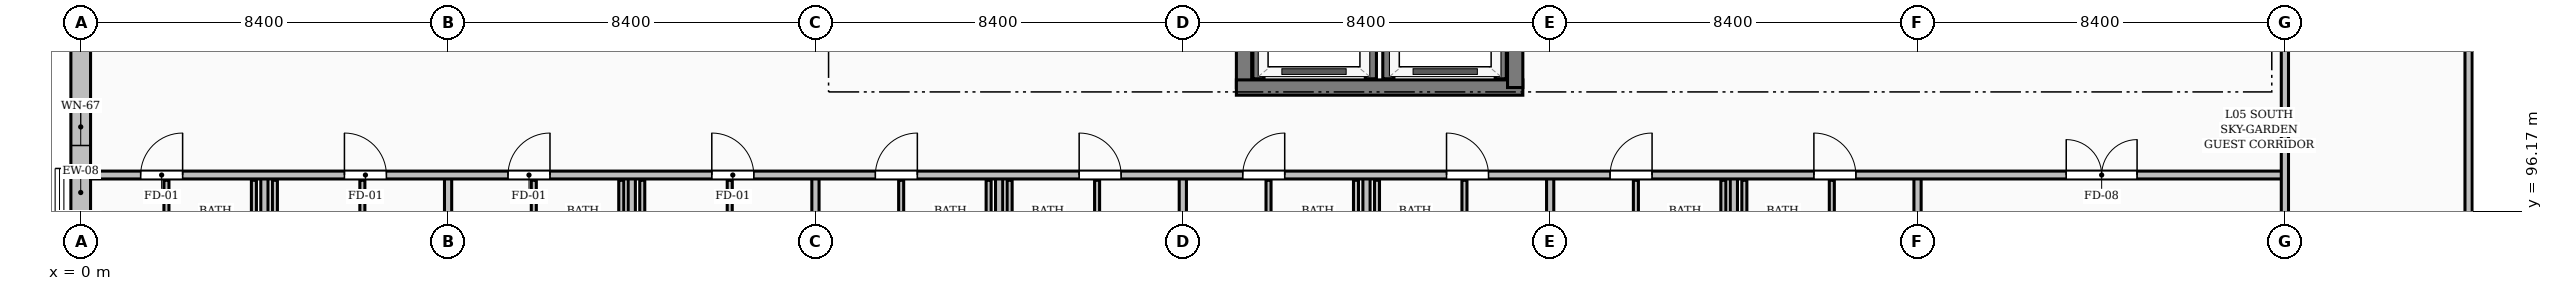
"""IFC4 building model, lengths in metres.
Left out: names, types, materials, properties, quantities, classifications, styles, units other than length and angle.
Written with IfcOpenShell. Run it as: python <this file> out.ifc"""

import sys

from ifc_helpers import new_model, si_unit, direction, frame, frame_2d, origin, place, context, subcontext, project, spatial, rectangle, extrude, element, fill, save


model = new_model("IFC4")
c1 = context("Model", 3, precision=1e-05, world=origin(), true_north=direction((0.0, 1.0)))
c2 = subcontext(c1, "Body", "Model", "MODEL_VIEW")
j1 = project(units=[si_unit("LENGTHUNIT", "METRE"), si_unit("PLANEANGLEUNIT", "RADIAN")], contexts=[c1])
p1 = place(None, origin())
s1 = spatial("IfcSite", under=j1, at=p1, CompositionType="ELEMENT")
p2 = place(p1, origin())
s2 = spatial("IfcBuilding", under=s1, at=p2, CompositionType="ELEMENT")
p3 = place(p2, frame((0.0, 0.0, 18.48)))
s3 = spatial("IfcBuildingStorey", under=s2, at=p3, CompositionType="ELEMENT", Elevation=18.48)
p4 = place(p3, frame((26.6, 99.0, 0.0), z_axis=(0.0, 0.0, 1.0), x_axis=(0.0, 1.0, 0.0)))
e1 = element("IfcWall", 1, at=p4, inside=s3, PredefinedType="SHEAR", context=c2, shape_type="SweptSolid", body=[
    extrude(rectangle(XDim=6.15, YDim=0.35, at=frame_2d((3.075, 0.0))), origin(), (0.0, 0.0, 1.0), 3.12),
])
p5 = place(p3, frame((26.425, 99.0, 0.0), z_axis=(0.0, 0.0, 1.0), x_axis=(1.0, 0.0, 0.0)))
e2 = element("IfcWall", 2, at=p5, inside=s3, PredefinedType="SHEAR", context=c2, shape_type="SweptSolid", body=[
    extrude(rectangle(XDim=6.55, YDim=0.35, at=frame_2d((3.275, 0.0))), origin(), (0.0, 0.0, 1.0), 3.12),
])
p6 = place(p3, frame((32.8, 99.0, 0.0), z_axis=(0.0, 0.0, 1.0), x_axis=(0.0, 1.0, 0.0)))
e3 = element("IfcWall", 3, at=p6, inside=s3, PredefinedType="SHEAR", context=c2, shape_type="SweptSolid", body=[
    extrude(rectangle(XDim=6.15, YDim=0.35, at=frame_2d((3.075, 0.0))), origin(), (0.0, 0.0, 1.0), 3.12),
])
p7 = place(p3, frame((0.0, 92.751, 0.0), z_axis=(0.0, 0.0, 1.0), x_axis=(0.0, 1.0, 0.0)))
e4 = element("IfcWall", 4, at=p7, inside=s3, PredefinedType="SOLIDWALL", context=c2, shape_type="SweptSolid", body=[
    extrude(rectangle(XDim=7.698, YDim=0.45, at=frame_2d((3.849, 0.0))), origin(), (0.0, 0.0, 1.0), 2.494),
])
p8 = place(p7, frame((2.374, 0.0, 0.3)))
e5 = element("IfcOpeningElement", 5, at=p8, cuts=e4, PredefinedType="OPENING", context=c2, shape_type="SweptSolid", body=[
    extrude(rectangle(XDim=0.85, YDim=1.9, at=frame_2d((0.425, 0.95))), frame((0.0, 0.235, 0.0), z_axis=(0.0, -1.0, 0.0), x_axis=(1.0, 0.0, 0.0)), (0.0, 0.0, 1.0), 0.47),
])
p9 = place(p7, frame((4.924, 0.0, 0.3)))
e6 = element("IfcOpeningElement", 6, at=p9, cuts=e4, PredefinedType="OPENING", context=c2, shape_type="SweptSolid", body=[
    extrude(rectangle(XDim=0.85, YDim=1.9, at=frame_2d((0.425, 0.95))), frame((0.0, 0.235, 0.0), z_axis=(0.0, -1.0, 0.0), x_axis=(1.0, 0.0, 0.0)), (0.0, 0.0, 1.0), 0.47),
])
for number, where, z_axis, x_axis in (
    (7, (26.93, 99.2, 0.0), (0.0, 0.0, 1.0), (0.0, 1.0, 0.0)),
    (8, (29.5, 99.2, 0.0), (0.0, 0.0, 1.0), (0.0, 1.0, 0.0)),
    (9, (29.9, 99.2, 0.0), (0.0, 0.0, 1.0), (0.0, 1.0, 0.0)),
    (10, (32.47, 99.2, 0.0), (0.0, 0.0, 1.0), (0.0, 1.0, 0.0)),
):
    element("IfcWall", number, at=place(p3, frame(where, z_axis=z_axis, x_axis=x_axis)), inside=s3, PredefinedType="SOLIDWALL", context=c2, shape_type="SweptSolid", body=[
        extrude(rectangle(XDim=2.2, YDim=0.255, at=frame_2d((1.1, 0.0))), origin(), (0.0, 0.0, 1.0), 3.12),
    ])
p10 = place(p3, frame((1.96, 94.73, 0.0), z_axis=(0.0, 0.0, 1.0), x_axis=(0.0, 1.0, 0.0)))
e11 = element("IfcWall", 11, at=p10, inside=s3, PredefinedType="PARTITIONING", context=c2, shape_type="SweptSolid", body=[
    extrude(rectangle(XDim=2.15, YDim=0.115, at=frame_2d((1.075, 0.0))), origin(), (0.0, 0.0, 1.0), 2.642),
])
for number, where, z_axis, x_axis in (
    (12, (3.96, 94.73, 0.0), (0.0, 0.0, 1.0), (0.0, 1.0, 0.0)),
    (13, (4.44, 94.73, 0.0), (0.0, 0.0, 1.0), (0.0, 1.0, 0.0)),
):
    element("IfcWall", number, at=place(p3, frame(where, z_axis=z_axis, x_axis=x_axis)), inside=s3, PredefinedType="PARTITIONING", context=c2, shape_type="SweptSolid", body=[
        extrude(rectangle(XDim=2.15, YDim=0.115, at=frame_2d((1.075, 0.0))), origin(), (0.0, 0.0, 1.0), 3.12),
    ])
p11 = place(p3, frame((6.44, 94.73, 0.0), z_axis=(0.0, 0.0, 1.0), x_axis=(0.0, 1.0, 0.0)))
e14 = element("IfcWall", 14, at=p11, inside=s3, PredefinedType="PARTITIONING", context=c2, shape_type="SweptSolid", body=[
    extrude(rectangle(XDim=2.15, YDim=0.115, at=frame_2d((1.075, 0.0))), origin(), (0.0, 0.0, 1.0), 2.642),
])
p12 = place(p3, frame((4.2, 92.625, 0.0), z_axis=(0.0, 0.0, 1.0), x_axis=(0.0, 1.0, 0.0)))
e15 = element("IfcWall", 15, at=p12, inside=s3, PredefinedType="PARTITIONING", context=c2, shape_type="SweptSolid", body=[
    extrude(rectangle(XDim=4.375, YDim=0.165, at=frame_2d((2.188, 0.0))), origin(), (0.0, 0.0, 1.0), 3.12),
])
for number, where, z_axis, x_axis in (
    (16, (10.36, 94.73, 0.0), (0.0, 0.0, 1.0), (0.0, 1.0, 0.0)),
    (17, (12.36, 94.73, 0.0), (0.0, 0.0, 1.0), (0.0, 1.0, 0.0)),
    (18, (12.84, 94.73, 0.0), (0.0, 0.0, 1.0), (0.0, 1.0, 0.0)),
    (19, (14.84, 94.73, 0.0), (0.0, 0.0, 1.0), (0.0, 1.0, 0.0)),
):
    element("IfcWall", number, at=place(p3, frame(where, z_axis=z_axis, x_axis=x_axis)), inside=s3, PredefinedType="PARTITIONING", context=c2, shape_type="SweptSolid", body=[
        extrude(rectangle(XDim=2.15, YDim=0.115, at=frame_2d((1.075, 0.0))), origin(), (0.0, 0.0, 1.0), 3.12),
    ])
p13 = place(p3, frame((12.6, 92.53, 0.0), z_axis=(0.0, 0.0, 1.0), x_axis=(0.0, 1.0, 0.0)))
e20 = element("IfcWall", 20, at=p13, inside=s3, PredefinedType="PARTITIONING", context=c2, shape_type="SweptSolid", body=[
    extrude(rectangle(XDim=4.47, YDim=0.165, at=frame_2d((2.235, 0.0))), origin(), (0.0, 0.0, 1.0), 3.12),
])
p14 = place(p3, frame((8.4, 92.75, 0.0), z_axis=(0.0, 0.0, 1.0), x_axis=(0.0, 1.0, 0.0)))
e21 = element("IfcWall", 21, at=p14, inside=s3, PredefinedType="PARTITIONING", context=c2, shape_type="SweptSolid", body=[
    extrude(rectangle(XDim=4.25, YDim=0.165, at=frame_2d((2.125, 0.0))), origin(), (0.0, 0.0, 1.0), 2.455),
])
p15 = place(p3, frame((18.76, 94.73, 0.0), z_axis=(0.0, 0.0, 1.0), x_axis=(0.0, 1.0, 0.0)))
e22 = element("IfcWall", 22, at=p15, inside=s3, PredefinedType="PARTITIONING", context=c2, shape_type="SweptSolid", body=[
    extrude(rectangle(XDim=2.15, YDim=0.115, at=frame_2d((1.075, 0.0))), origin(), (0.0, 0.0, 1.0), 2.642),
])
for number, where, z_axis, x_axis in (
    (23, (20.76, 94.73, 0.0), (0.0, 0.0, 1.0), (0.0, 1.0, 0.0)),
    (24, (21.24, 94.73, 0.0), (0.0, 0.0, 1.0), (0.0, 1.0, 0.0)),
):
    element("IfcWall", number, at=place(p3, frame(where, z_axis=z_axis, x_axis=x_axis)), inside=s3, PredefinedType="PARTITIONING", context=c2, shape_type="SweptSolid", body=[
        extrude(rectangle(XDim=2.15, YDim=0.115, at=frame_2d((1.075, 0.0))), origin(), (0.0, 0.0, 1.0), 3.12),
    ])
p16 = place(p3, frame((23.24, 94.73, 0.0), z_axis=(0.0, 0.0, 1.0), x_axis=(0.0, 1.0, 0.0)))
e25 = element("IfcWall", 25, at=p16, inside=s3, PredefinedType="PARTITIONING", context=c2, shape_type="SweptSolid", body=[
    extrude(rectangle(XDim=2.15, YDim=0.115, at=frame_2d((1.075, 0.0))), origin(), (0.0, 0.0, 1.0), 2.642),
])
p17 = place(p3, frame((21.0, 92.54, 0.0), z_axis=(0.0, 0.0, 1.0), x_axis=(0.0, 1.0, 0.0)))
e26 = element("IfcWall", 26, at=p17, inside=s3, PredefinedType="PARTITIONING", context=c2, shape_type="SweptSolid", body=[
    extrude(rectangle(XDim=4.46, YDim=0.165, at=frame_2d((2.23, 0.0))), origin(), (0.0, 0.0, 1.0), 3.12),
])
p18 = place(p3, frame((16.8, 92.75, 0.0), z_axis=(0.0, 0.0, 1.0), x_axis=(0.0, 1.0, 0.0)))
e27 = element("IfcWall", 27, at=p18, inside=s3, PredefinedType="PARTITIONING", context=c2, shape_type="SweptSolid", body=[
    extrude(rectangle(XDim=4.25, YDim=0.165, at=frame_2d((2.125, 0.0))), origin(), (0.0, 0.0, 1.0), 2.455),
])
for number, where, z_axis, x_axis in (
    (28, (27.16, 94.73, 0.0), (0.0, 0.0, 1.0), (0.0, 1.0, 0.0)),
    (29, (29.16, 94.73, 0.0), (0.0, 0.0, 1.0), (0.0, 1.0, 0.0)),
    (30, (29.64, 94.73, 0.0), (0.0, 0.0, 1.0), (0.0, 1.0, 0.0)),
    (31, (31.64, 94.73, 0.0), (0.0, 0.0, 1.0), (0.0, 1.0, 0.0)),
):
    element("IfcWall", number, at=place(p3, frame(where, z_axis=z_axis, x_axis=x_axis)), inside=s3, PredefinedType="PARTITIONING", context=c2, shape_type="SweptSolid", body=[
        extrude(rectangle(XDim=2.15, YDim=0.115, at=frame_2d((1.075, 0.0))), origin(), (0.0, 0.0, 1.0), 3.12),
    ])
p19 = place(p3, frame((29.4, 92.55, 0.0), z_axis=(0.0, 0.0, 1.0), x_axis=(0.0, 1.0, 0.0)))
e32 = element("IfcWall", 32, at=p19, inside=s3, PredefinedType="PARTITIONING", context=c2, shape_type="SweptSolid", body=[
    extrude(rectangle(XDim=4.45, YDim=0.165, at=frame_2d((2.225, 0.0))), origin(), (0.0, 0.0, 1.0), 3.12),
])
p20 = place(p3, frame((25.2, 92.75, 0.0), z_axis=(0.0, 0.0, 1.0), x_axis=(0.0, 1.0, 0.0)))
e33 = element("IfcWall", 33, at=p20, inside=s3, PredefinedType="PARTITIONING", context=c2, shape_type="SweptSolid", body=[
    extrude(rectangle(XDim=4.25, YDim=0.165, at=frame_2d((2.125, 0.0))), origin(), (0.0, 0.0, 1.0), 2.455),
])
p21 = place(p3, frame((35.56, 94.73, 0.0), z_axis=(0.0, 0.0, 1.0), x_axis=(0.0, 1.0, 0.0)))
e34 = element("IfcWall", 34, at=p21, inside=s3, PredefinedType="PARTITIONING", context=c2, shape_type="SweptSolid", body=[
    extrude(rectangle(XDim=2.15, YDim=0.115, at=frame_2d((1.075, 0.0))), origin(), (0.0, 0.0, 1.0), 2.642),
])
for number, where, z_axis, x_axis in (
    (35, (37.56, 94.73, 0.0), (0.0, 0.0, 1.0), (0.0, 1.0, 0.0)),
    (36, (38.04, 94.73, 0.0), (0.0, 0.0, 1.0), (0.0, 1.0, 0.0)),
):
    element("IfcWall", number, at=place(p3, frame(where, z_axis=z_axis, x_axis=x_axis)), inside=s3, PredefinedType="PARTITIONING", context=c2, shape_type="SweptSolid", body=[
        extrude(rectangle(XDim=2.15, YDim=0.115, at=frame_2d((1.075, 0.0))), origin(), (0.0, 0.0, 1.0), 3.12),
    ])
p22 = place(p3, frame((40.04, 94.73, 0.0), z_axis=(0.0, 0.0, 1.0), x_axis=(0.0, 1.0, 0.0)))
e37 = element("IfcWall", 37, at=p22, inside=s3, PredefinedType="PARTITIONING", context=c2, shape_type="SweptSolid", body=[
    extrude(rectangle(XDim=2.15, YDim=0.115, at=frame_2d((1.075, 0.0))), origin(), (0.0, 0.0, 1.0), 2.642),
])
p23 = place(p3, frame((37.8, 92.562, 0.0), z_axis=(0.0, 0.0, 1.0), x_axis=(0.0, 1.0, 0.0)))
e38 = element("IfcWall", 38, at=p23, inside=s3, PredefinedType="PARTITIONING", context=c2, shape_type="SweptSolid", body=[
    extrude(rectangle(XDim=4.438, YDim=0.165, at=frame_2d((2.219, 0.0))), origin(), (0.0, 0.0, 1.0), 3.12),
])
for number, where, z_axis, x_axis in (
    (39, (33.6, 92.75, 0.0), (0.0, 0.0, 1.0), (0.0, 1.0, 0.0)),
    (40, (42.0, 92.75, 0.0), (0.0, 0.0, 1.0), (0.0, 1.0, 0.0)),
):
    element("IfcWall", number, at=place(p3, frame(where, z_axis=z_axis, x_axis=x_axis)), inside=s3, PredefinedType="PARTITIONING", context=c2, shape_type="SweptSolid", body=[
        extrude(rectangle(XDim=4.25, YDim=0.165, at=frame_2d((2.125, 0.0))), origin(), (0.0, 0.0, 1.0), 2.455),
    ])
p24 = place(p3, frame((0.225, 97.0, 0.0), z_axis=(0.0, 0.0, 1.0), x_axis=(1.0, 0.0, 0.0)))
e41 = element("IfcWall", 41, at=p24, inside=s3, PredefinedType="PARTITIONING", context=c2, shape_type="SweptSolid", body=[
    extrude(rectangle(XDim=50.175, YDim=0.18, at=frame_2d((25.087, 0.0))), origin(), (0.0, 0.0, 1.0), 3.12),
])
p25 = place(p24, frame((1.145, 0.0, 0.0)))
e42 = element("IfcOpeningElement", 42, at=p25, cuts=e41, PredefinedType="OPENING", context=c2, shape_type="SweptSolid", body=[
    extrude(rectangle(XDim=0.96, YDim=2.15, at=frame_2d((0.48, 1.075))), frame((0.0, 0.1, 0.0), z_axis=(0.0, -1.0, 0.0), x_axis=(1.0, 0.0, 0.0)), (0.0, 0.0, 1.0), 0.2),
])
p26 = place(p24, frame((5.805, 0.0, 0.0)))
e43 = element("IfcOpeningElement", 43, at=p26, cuts=e41, PredefinedType="OPENING", context=c2, shape_type="SweptSolid", body=[
    extrude(rectangle(XDim=0.96, YDim=2.15, at=frame_2d((0.48, 1.075))), frame((0.0, 0.1, 0.0), z_axis=(0.0, -1.0, 0.0), x_axis=(1.0, 0.0, 0.0)), (0.0, 0.0, 1.0), 0.2),
])
p27 = place(p24, frame((9.545, 0.0, 0.0)))
e44 = element("IfcOpeningElement", 44, at=p27, cuts=e41, PredefinedType="OPENING", context=c2, shape_type="SweptSolid", body=[
    extrude(rectangle(XDim=0.96, YDim=2.15, at=frame_2d((0.48, 1.075))), frame((0.0, 0.1, 0.0), z_axis=(0.0, -1.0, 0.0), x_axis=(1.0, 0.0, 0.0)), (0.0, 0.0, 1.0), 0.2),
])
p28 = place(p24, frame((14.205, 0.0, 0.0)))
e45 = element("IfcOpeningElement", 45, at=p28, cuts=e41, PredefinedType="OPENING", context=c2, shape_type="SweptSolid", body=[
    extrude(rectangle(XDim=0.96, YDim=2.15, at=frame_2d((0.48, 1.075))), frame((0.0, 0.1, 0.0), z_axis=(0.0, -1.0, 0.0), x_axis=(1.0, 0.0, 0.0)), (0.0, 0.0, 1.0), 0.2),
])
p29 = place(p24, frame((17.945, 0.0, 0.0)))
e46 = element("IfcOpeningElement", 46, at=p29, cuts=e41, PredefinedType="OPENING", context=c2, shape_type="SweptSolid", body=[
    extrude(rectangle(XDim=0.96, YDim=2.15, at=frame_2d((0.48, 1.075))), frame((0.0, 0.1, 0.0), z_axis=(0.0, -1.0, 0.0), x_axis=(1.0, 0.0, 0.0)), (0.0, 0.0, 1.0), 0.2),
])
p30 = place(p24, frame((22.605, 0.0, 0.0)))
e47 = element("IfcOpeningElement", 47, at=p30, cuts=e41, PredefinedType="OPENING", context=c2, shape_type="SweptSolid", body=[
    extrude(rectangle(XDim=0.96, YDim=2.15, at=frame_2d((0.48, 1.075))), frame((0.0, 0.1, 0.0), z_axis=(0.0, -1.0, 0.0), x_axis=(1.0, 0.0, 0.0)), (0.0, 0.0, 1.0), 0.2),
])
p31 = place(p24, frame((26.345, 0.0, 0.0)))
e48 = element("IfcOpeningElement", 48, at=p31, cuts=e41, PredefinedType="OPENING", context=c2, shape_type="SweptSolid", body=[
    extrude(rectangle(XDim=0.96, YDim=2.15, at=frame_2d((0.48, 1.075))), frame((0.0, 0.1, 0.0), z_axis=(0.0, -1.0, 0.0), x_axis=(1.0, 0.0, 0.0)), (0.0, 0.0, 1.0), 0.2),
])
p32 = place(p24, frame((31.005, 0.0, 0.0)))
e49 = element("IfcOpeningElement", 49, at=p32, cuts=e41, PredefinedType="OPENING", context=c2, shape_type="SweptSolid", body=[
    extrude(rectangle(XDim=0.96, YDim=2.15, at=frame_2d((0.48, 1.075))), frame((0.0, 0.1, 0.0), z_axis=(0.0, -1.0, 0.0), x_axis=(1.0, 0.0, 0.0)), (0.0, 0.0, 1.0), 0.2),
])
p33 = place(p24, frame((34.745, 0.0, 0.0)))
e50 = element("IfcOpeningElement", 50, at=p33, cuts=e41, PredefinedType="OPENING", context=c2, shape_type="SweptSolid", body=[
    extrude(rectangle(XDim=0.96, YDim=2.15, at=frame_2d((0.48, 1.075))), frame((0.0, 0.1, 0.0), z_axis=(0.0, -1.0, 0.0), x_axis=(1.0, 0.0, 0.0)), (0.0, 0.0, 1.0), 0.2),
])
p34 = place(p24, frame((39.405, 0.0, 0.0)))
e51 = element("IfcOpeningElement", 51, at=p34, cuts=e41, PredefinedType="OPENING", context=c2, shape_type="SweptSolid", body=[
    extrude(rectangle(XDim=0.96, YDim=2.15, at=frame_2d((0.48, 1.075))), frame((0.0, 0.1, 0.0), z_axis=(0.0, -1.0, 0.0), x_axis=(1.0, 0.0, 0.0)), (0.0, 0.0, 1.0), 0.2),
])
p35 = place(p24, frame((45.175, 0.0, 0.0)))
e52 = element("IfcOpeningElement", 52, at=p35, cuts=e41, PredefinedType="OPENING", context=c2, shape_type="SweptSolid", body=[
    extrude(rectangle(XDim=1.62, YDim=2.2, at=frame_2d((0.81, 1.1))), frame((0.0, 0.1, 0.0), z_axis=(0.0, -1.0, 0.0), x_axis=(1.0, 0.0, 0.0)), (0.0, 0.0, 1.0), 0.2),
])
p36 = place(p3, frame((54.6, 92.59, 0.0), z_axis=(0.0, 0.0, 1.0), x_axis=(0.0, 1.0, 0.0)))
e53 = element("IfcWall", 53, at=p36, inside=s3, PredefinedType="PARTITIONING", context=c2, shape_type="SweptSolid", body=[
    extrude(rectangle(XDim=12.51, YDim=0.165, at=frame_2d((6.255, 0.0))), origin(), (0.0, 0.0, 1.0), 3.12),
])
p37 = place(p3, frame((50.4, 92.75, 0.0), z_axis=(0.0, 0.0, 1.0), x_axis=(0.0, 1.0, 0.0)))
e54 = element("IfcWall", 54, at=p37, inside=s3, PredefinedType="PARTITIONING", context=c2, shape_type="SweptSolid", body=[
    extrude(rectangle(XDim=12.35, YDim=0.165, at=frame_2d((6.175, 0.0))), origin(), (0.0, 0.0, 1.0), 2.455),
])
p38 = place(p9, origin())
e55 = element("IfcWindow", 55, at=p38, inside=s3, PartitioningType="SINGLE_PANEL", PredefinedType="WINDOW", context=c2, shape_type="SweptSolid", body=[
    extrude(rectangle(XDim=0.85, YDim=1.9, at=frame_2d((0.425, 0.95))), frame((0.0, 0.03, 0.0), z_axis=(0.0, -1.0, 0.0), x_axis=(1.0, 0.0, 0.0)), (0.0, 0.0, 1.0), 0.06),
])
fill(e6, e55)
p39 = place(p25, origin())
e56 = element("IfcDoor", 56, at=p39, inside=s3, OperationType="SINGLE_SWING_RIGHT", PredefinedType="DOOR", context=c2, shape_type="SweptSolid", body=[
    extrude(rectangle(XDim=0.96, YDim=2.15, at=frame_2d((0.48, 1.075))), frame((0.0, 0.025, 0.0), z_axis=(0.0, -1.0, 0.0), x_axis=(1.0, 0.0, 0.0)), (0.0, 0.0, 1.0), 0.05),
])
fill(e42, e56)
p40 = place(p26, origin())
e57 = element("IfcDoor", 57, at=p40, inside=s3, OperationType="SINGLE_SWING_LEFT", PredefinedType="DOOR", context=c2, shape_type="SweptSolid", body=[
    extrude(rectangle(XDim=0.96, YDim=2.15, at=frame_2d((0.48, 1.075))), frame((0.0, 0.025, 0.0), z_axis=(0.0, -1.0, 0.0), x_axis=(1.0, 0.0, 0.0)), (0.0, 0.0, 1.0), 0.05),
])
fill(e43, e57)
p41 = place(p27, origin())
e58 = element("IfcDoor", 58, at=p41, inside=s3, OperationType="SINGLE_SWING_RIGHT", PredefinedType="DOOR", context=c2, shape_type="SweptSolid", body=[
    extrude(rectangle(XDim=0.96, YDim=2.15, at=frame_2d((0.48, 1.075))), frame((0.0, 0.025, 0.0), z_axis=(0.0, -1.0, 0.0), x_axis=(1.0, 0.0, 0.0)), (0.0, 0.0, 1.0), 0.05),
])
fill(e44, e58)
p42 = place(p28, origin())
e59 = element("IfcDoor", 59, at=p42, inside=s3, OperationType="SINGLE_SWING_LEFT", PredefinedType="DOOR", context=c2, shape_type="SweptSolid", body=[
    extrude(rectangle(XDim=0.96, YDim=2.15, at=frame_2d((0.48, 1.075))), frame((0.0, 0.025, 0.0), z_axis=(0.0, -1.0, 0.0), x_axis=(1.0, 0.0, 0.0)), (0.0, 0.0, 1.0), 0.05),
])
fill(e45, e59)
p43 = place(p29, origin())
e60 = element("IfcDoor", 60, at=p43, inside=s3, OperationType="SINGLE_SWING_RIGHT", PredefinedType="DOOR", context=c2, shape_type="SweptSolid", body=[
    extrude(rectangle(XDim=0.96, YDim=2.15, at=frame_2d((0.48, 1.075))), frame((0.0, 0.025, 0.0), z_axis=(0.0, -1.0, 0.0), x_axis=(1.0, 0.0, 0.0)), (0.0, 0.0, 1.0), 0.05),
])
fill(e46, e60)
p44 = place(p30, origin())
e61 = element("IfcDoor", 61, at=p44, inside=s3, OperationType="SINGLE_SWING_LEFT", PredefinedType="DOOR", context=c2, shape_type="SweptSolid", body=[
    extrude(rectangle(XDim=0.96, YDim=2.15, at=frame_2d((0.48, 1.075))), frame((0.0, 0.025, 0.0), z_axis=(0.0, -1.0, 0.0), x_axis=(1.0, 0.0, 0.0)), (0.0, 0.0, 1.0), 0.05),
])
fill(e47, e61)
p45 = place(p31, origin())
e62 = element("IfcDoor", 62, at=p45, inside=s3, OperationType="SINGLE_SWING_RIGHT", PredefinedType="DOOR", context=c2, shape_type="SweptSolid", body=[
    extrude(rectangle(XDim=0.96, YDim=2.15, at=frame_2d((0.48, 1.075))), frame((0.0, 0.025, 0.0), z_axis=(0.0, -1.0, 0.0), x_axis=(1.0, 0.0, 0.0)), (0.0, 0.0, 1.0), 0.05),
])
fill(e48, e62)
p46 = place(p32, origin())
e63 = element("IfcDoor", 63, at=p46, inside=s3, OperationType="SINGLE_SWING_LEFT", PredefinedType="DOOR", context=c2, shape_type="SweptSolid", body=[
    extrude(rectangle(XDim=0.96, YDim=2.15, at=frame_2d((0.48, 1.075))), frame((0.0, 0.025, 0.0), z_axis=(0.0, -1.0, 0.0), x_axis=(1.0, 0.0, 0.0)), (0.0, 0.0, 1.0), 0.05),
])
fill(e49, e63)
p47 = place(p33, origin())
e64 = element("IfcDoor", 64, at=p47, inside=s3, OperationType="SINGLE_SWING_RIGHT", PredefinedType="DOOR", context=c2, shape_type="SweptSolid", body=[
    extrude(rectangle(XDim=0.96, YDim=2.15, at=frame_2d((0.48, 1.075))), frame((0.0, 0.025, 0.0), z_axis=(0.0, -1.0, 0.0), x_axis=(1.0, 0.0, 0.0)), (0.0, 0.0, 1.0), 0.05),
])
fill(e50, e64)
p48 = place(p34, origin())
e65 = element("IfcDoor", 65, at=p48, inside=s3, OperationType="SINGLE_SWING_LEFT", PredefinedType="DOOR", context=c2, shape_type="SweptSolid", body=[
    extrude(rectangle(XDim=0.96, YDim=2.15, at=frame_2d((0.48, 1.075))), frame((0.0, 0.025, 0.0), z_axis=(0.0, -1.0, 0.0), x_axis=(1.0, 0.0, 0.0)), (0.0, 0.0, 1.0), 0.05),
])
fill(e51, e65)
p49 = place(p35, origin())
e66 = element("IfcDoor", 66, at=p49, inside=s3, OperationType="DOUBLE_DOOR_SINGLE_SWING", PredefinedType="DOOR", context=c2, shape_type="SweptSolid", body=[
    extrude(rectangle(XDim=1.62, YDim=2.2, at=frame_2d((0.81, 1.1))), frame((0.0, 0.025, 0.0), z_axis=(0.0, -1.0, 0.0), x_axis=(1.0, 0.0, 0.0)), (0.0, 0.0, 1.0), 0.05),
])
fill(e52, e66)
save(model, sys.argv[1])
